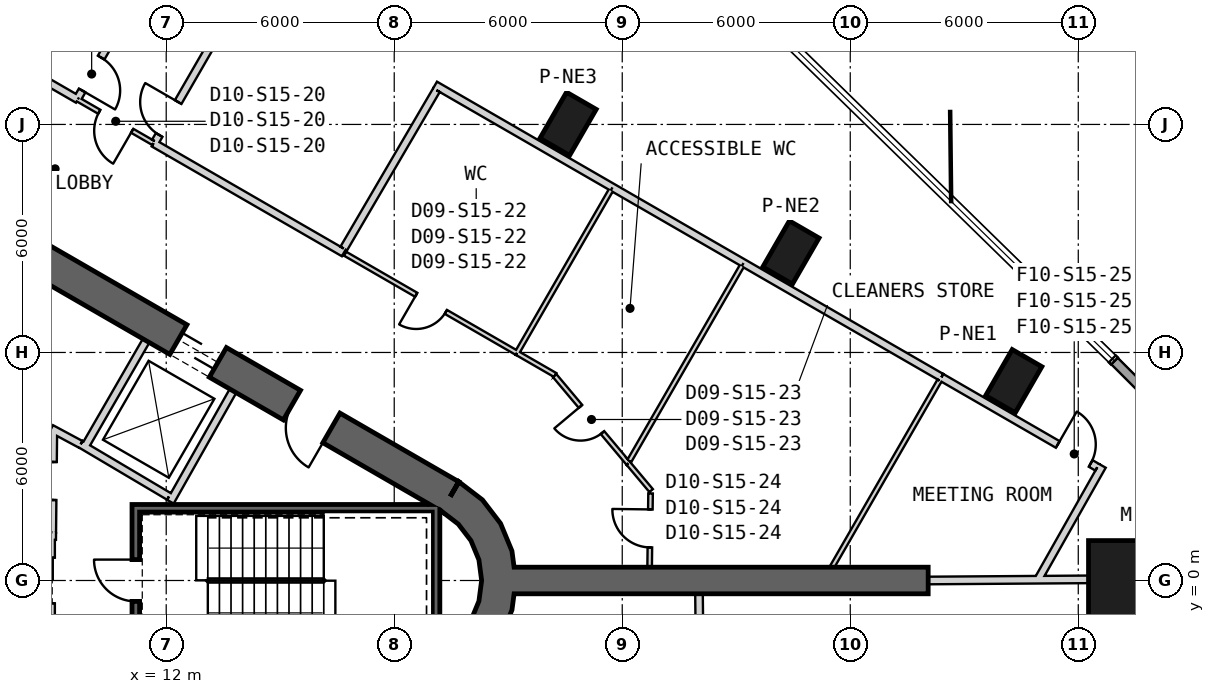
"""IFC4 building model, lengths in metres.
Left out: names, types, materials, properties, quantities, classifications, styles, units other than length and angle.
Written with IfcOpenShell. Run it as: python <this file> out.ifc"""

import sys

from ifc_helpers import new_model, si_unit, direction, frame, frame_2d, origin, origin_2d, place, context, subcontext, project, spatial, polyline, rectangle, outline, extrude, element, fill, save


model = new_model("IFC4")
c1 = context("Model", 3, precision=1e-05, world=origin(), true_north=direction((0.0, 1.0)))
c2 = subcontext(c1, "Body", "Model", "MODEL_VIEW")
j1 = project(units=[si_unit("LENGTHUNIT", "METRE"), si_unit("PLANEANGLEUNIT", "RADIAN")], contexts=[c1])
p1 = place(None, origin())
s1 = spatial("IfcSite", under=j1, at=p1, CompositionType="ELEMENT")
p2 = place(p1, origin())
s2 = spatial("IfcBuilding", under=s1, at=p2, CompositionType="ELEMENT")
p3 = place(p2, frame((0.0, 0.0, 241.2)))
s3 = spatial("IfcBuildingStorey", under=s2, at=p3, CompositionType="ELEMENT", Elevation=241.2)
p4 = place(p3, frame((37.57, 0.0, 0.0), z_axis=(0.0, 0.0, 1.0), x_axis=(1.0, 0.0, 0.0)))
e1 = element("IfcColumn", 1, at=p4, inside=s3, PredefinedType="COLUMN", context=c2, shape_type="SweptSolid", body=[
    extrude(rectangle(XDim=2.6, YDim=2.1, at=origin_2d()), origin(), (0.0, 0.0, 1.0), 4.0),
])
for number, where, z_axis, x_axis in (
    (2, (34.302, 5.245, 0.0), (0.0, 0.0, 1.0), (0.5, 0.866, 0.0)),
    (3, (28.438, 8.631, 0.0), (0.0, 0.0, 1.0), (0.5, 0.866, 0.0)),
    (4, (22.574, 12.016, 0.0), (0.0, 0.0, 1.0), (0.5, 0.866, 0.0)),
):
    element("IfcColumn", number, at=place(p3, frame(where, z_axis=z_axis, x_axis=x_axis)), inside=s3, PredefinedType="COLUMN", context=c2, shape_type="SweptSolid", body=[
        extrude(rectangle(XDim=1.4, YDim=0.9, at=origin_2d()), origin(), (0.0, 0.0, 1.0), 4.0),
    ])
p5 = place(p3, frame((19.475, 2.208, 0.0), z_axis=(0.0, 0.0, 1.0), x_axis=(-0.866028369851, 0.499994862586, 0.0)))
e5 = element("IfcWall", 5, at=p5, inside=s3, PredefinedType="SHEAR", context=c2, shape_type="SweptSolid", body=[
    extrude(rectangle(XDim=31.523, YDim=0.9, at=frame_2d((15.762, 0.0))), origin(), (0.0, 0.0, 1.0), 4.0),
])
p6 = place(p5, frame((7.062, 0.0, 0.0)))
e6 = element("IfcOpeningElement", 6, at=p6, cuts=e5, PredefinedType="OPENING", context=c2, shape_type="SweptSolid", body=[
    extrude(rectangle(XDim=1.2, YDim=2.4, at=frame_2d((0.6, 1.2))), frame((0.0, 0.46, 0.0), z_axis=(0.0, -1.0, 0.0), x_axis=(1.0, 0.0, 0.0)), (0.0, 0.0, 1.0), 0.92),
])
p7 = place(p5, frame((3.612, 0.0, 0.0)))
e7 = element("IfcOpeningElement", 7, at=p7, cuts=e5, PredefinedType="OPENING", context=c2, shape_type="SweptSolid", body=[
    extrude(rectangle(XDim=1.2, YDim=2.4, at=frame_2d((0.6, 1.2))), frame((0.0, 0.46, 0.0), z_axis=(0.0, -1.0, 0.0), x_axis=(1.0, 0.0, 0.0)), (0.0, 0.0, 1.0), 0.92),
])
p8 = place(p5, frame((26.712, 0.0, 0.0)))
e8 = element("IfcOpeningElement", 8, at=p8, cuts=e5, PredefinedType="OPENING", context=c2, shape_type="SweptSolid", body=[
    extrude(rectangle(XDim=1.2, YDim=2.4, at=frame_2d((0.6, 1.2))), frame((0.0, 0.46, 0.0), z_axis=(0.0, -1.0, 0.0), x_axis=(1.0, 0.0, 0.0)), (0.0, 0.0, 1.0), 0.92),
])
p9 = place(p3, origin())
e9 = element("IfcWall", 9, at=p9, inside=s3, PredefinedType="SHEAR", context=c2, shape_type="SweptSolid", body=[
    extrude(outline(polyline([(19.7, -2.598), (20.321, -2.121), (20.798, -1.5), (21.098, -0.777), (21.2, 0.0), (21.098, 0.777), (20.798, 1.5), (20.321, 2.121), (19.7, 2.598), (19.25, 1.819), (19.685, 1.485), (20.019, 1.05), (20.229, 0.543), (20.3, 0.0), (20.229, -0.543), (20.019, -1.05), (19.685, -1.485), (19.25, -1.819), (19.7, -2.598)])), origin(), (0.0, 0.0, 1.0), 4.0),
])
p10 = place(p3, frame((21.15, 0.0, 0.0), z_axis=(0.0, 0.0, 1.0), x_axis=(1.0, 0.0, 0.0)))
e10 = element("IfcWall", 10, at=p10, inside=s3, PredefinedType="SHEAR", context=c2, shape_type="SweptSolid", body=[
    extrude(rectangle(XDim=10.9, YDim=0.7, at=frame_2d((5.45, 0.0))), origin(), (0.0, 0.0, 1.0), 4.0),
])
p11 = place(p3, frame((39.406, 3.321, 0.0), z_axis=(0.0, 0.0, 1.0), x_axis=(-0.707106781187, 0.707106781187, 0.0)))
e11 = element("IfcWall", 11, at=p11, inside=s3, PredefinedType="SOLIDWALL", context=c2, shape_type="SweptSolid", body=[
    extrude(rectangle(XDim=3.47, YDim=0.24, at=frame_2d((1.735, 0.0))), origin(), (0.0, 0.0, 1.0), 3.7),
])
p12 = place(p3, frame((9.847, 3.495, 0.0), z_axis=(0.0, 0.0, 1.0), x_axis=(0.499984717929, 0.866034226713, 0.0)))
e12 = element("IfcWall", 12, at=p12, inside=s3, PredefinedType="PLUMBINGWALL", context=c2, shape_type="SweptSolid", body=[
    extrude(rectangle(XDim=3.25, YDim=0.2, at=frame_2d((1.625, 0.0))), origin(), (0.0, 0.0, 1.0), 3.7),
])
p13 = place(p3, frame((12.11, 2.073, 0.0), z_axis=(0.0, 0.0, 1.0), x_axis=(0.49196600604, 0.870614408852, 0.0)))
e13 = element("IfcWall", 13, at=p13, inside=s3, PredefinedType="PLUMBINGWALL", context=c2, shape_type="SweptSolid", body=[
    extrude(rectangle(XDim=3.35, YDim=0.2, at=frame_2d((1.675, 0.0))), origin(), (0.0, 0.0, 1.0), 3.7),
])
p14 = place(p3, frame((12.073, 2.211, 0.0), z_axis=(0.0, 0.0, 1.0), x_axis=(-0.860414880418, 0.509594185166, 0.0)))
e14 = element("IfcWall", 14, at=p14, inside=s3, PredefinedType="PLUMBINGWALL", context=c2, shape_type="SweptSolid", body=[
    extrude(rectangle(XDim=2.7, YDim=0.2, at=frame_2d((1.35, 0.0))), origin(), (0.0, 0.0, 1.0), 3.7),
])
p15 = place(p3, frame((19.2, 1.9, -0.3), z_axis=(0.0, 0.0, 1.0), x_axis=(-1.0, 0.0, 0.0)))
e15 = element("IfcWall", 15, at=p15, inside=s3, PredefinedType="SHEAR", context=c2, shape_type="SweptSolid", body=[
    extrude(rectangle(XDim=8.1, YDim=0.2, at=frame_2d((4.05, 0.0))), origin(), (0.0, 0.0, 1.0), 4.0),
])
p16 = place(p3, frame((19.1, -2.0, -0.3), z_axis=(0.0, 0.0, 1.0), x_axis=(0.0, 1.0, 0.0)))
e16 = element("IfcWall", 16, at=p16, inside=s3, PredefinedType="SHEAR", context=c2, shape_type="SweptSolid", body=[
    extrude(rectangle(XDim=3.8, YDim=0.2, at=frame_2d((1.9, 0.0))), origin(), (0.0, 0.0, 1.0), 4.0),
])
p17 = place(p3, frame((11.2, -1.8, -0.3), z_axis=(0.0, 0.0, 1.0), x_axis=(0.0, 1.0, 0.0)))
e17 = element("IfcWall", 17, at=p17, inside=s3, PredefinedType="SHEAR", context=c2, shape_type="SweptSolid", body=[
    extrude(rectangle(XDim=3.6, YDim=0.2, at=frame_2d((1.8, 0.0))), origin(), (0.0, 0.0, 1.0), 4.0),
])
p18 = place(p17, frame((1.25, 0.0, 0.3)))
e18 = element("IfcOpeningElement", 18, at=p18, cuts=e17, PredefinedType="OPENING", context=c2, shape_type="SweptSolid", body=[
    extrude(rectangle(XDim=1.1, YDim=2.1, at=frame_2d((0.55, 1.05))), frame((0.0, 0.11, 0.0), z_axis=(0.0, -1.0, 0.0), x_axis=(1.0, 0.0, 0.0)), (0.0, 0.0, 1.0), 0.22),
])
p19 = place(p3, frame((8.97, 1.2, 0.0), z_axis=(0.0, 0.0, 1.0), x_axis=(0.0, -1.0, 0.0)))
e19 = element("IfcWall", 19, at=p19, inside=s3, PredefinedType="PLUMBINGWALL", context=c2, shape_type="SweptSolid", body=[
    extrude(rectangle(XDim=2.4, YDim=0.2, at=frame_2d((1.2, 0.0))), origin(), (0.0, 0.0, 1.0), 3.7),
])
p20 = place(p19, frame((0.6, 0.0, 0.0)))
e20 = element("IfcOpeningElement", 20, at=p20, cuts=e19, PredefinedType="OPENING", context=c2, shape_type="SweptSolid", body=[
    extrude(rectangle(XDim=1.2, YDim=2.4, at=frame_2d((0.6, 1.2))), frame((0.0, 0.11, 0.0), z_axis=(0.0, -1.0, 0.0), x_axis=(1.0, 0.0, 0.0)), (0.0, 0.0, 1.0), 0.22),
])
p21 = place(p3, frame((9.1, 1.169, 0.0), z_axis=(0.0, 0.0, 1.0), x_axis=(-0.99994990606, 0.010009264196, 0.0)))
e21 = element("IfcWall", 21, at=p21, inside=s3, PredefinedType="PLUMBINGWALL", context=c2, shape_type="SweptSolid", body=[
    extrude(rectangle(XDim=3.0, YDim=0.2, at=frame_2d((1.5, 0.0))), origin(), (0.0, 0.0, 1.0), 3.7),
])
p22 = place(p3, frame((8.974, 3.999, 0.0), z_axis=(0.0, 0.0, 1.0), x_axis=(0.880917147855, -0.473270513147, 0.0)))
e22 = element("IfcWall", 22, at=p22, inside=s3, PredefinedType="PARTITIONING", context=c2, shape_type="SweptSolid", body=[
    extrude(rectangle(XDim=0.878, YDim=0.2, at=frame_2d((0.439, 0.0))), origin(), (0.0, 0.0, 1.0), 3.7),
])
p23 = place(p3, frame((9.001, 1.27, 0.0), z_axis=(0.0, 0.0, 1.0), x_axis=(0.010723968736, 0.999942496594, 0.0)))
e23 = element("IfcWall", 23, at=p23, inside=s3, PredefinedType="PARTITIONING", context=c2, shape_type="SweptSolid", body=[
    extrude(rectangle(XDim=2.709, YDim=0.2, at=frame_2d((1.354, 0.0))), origin(), (0.0, 0.0, 1.0), 3.7),
])
p24 = place(p23, frame((0.848, 0.0, 0.0)))
e24 = element("IfcOpeningElement", 24, at=p24, cuts=e23, PredefinedType="OPENING", context=c2, shape_type="SweptSolid", body=[
    extrude(rectangle(XDim=1.0, YDim=2.1, at=frame_2d((0.5, 1.05))), frame((0.0, 0.11, 0.0), z_axis=(0.0, -1.0, 0.0), x_axis=(1.0, 0.0, 0.0)), (0.0, 0.0, 1.0), 0.22),
])
p25 = place(p3, frame((22.236, 5.406, 0.0), z_axis=(0.0, 0.0, 1.0), x_axis=(-0.866024722723, 0.500001179632, 0.0)))
e25 = element("IfcWall", 25, at=p25, inside=s3, PredefinedType="PARTITIONING", context=c2, shape_type="SweptSolid", body=[
    extrude(rectangle(XDim=1.163, YDim=0.12, at=frame_2d((0.581, 0.0))), origin(), (0.0, 0.0, 1.0), 3.7),
])
p26 = place(p3, frame((21.229, 5.988, 0.0), z_axis=(0.0, 0.0, 1.0), x_axis=(-0.866024383922, 0.50000176645, 0.0)))
e26 = element("IfcWall", 26, at=p26, inside=s3, PredefinedType="PARTITIONING", context=c2, shape_type="SweptSolid", body=[
    extrude(rectangle(XDim=5.221, YDim=0.12, at=frame_2d((2.61, 0.0))), origin(), (0.0, 0.0, 1.0), 2.98),
])
p27 = place(p26, frame((2.16, 0.0, 0.0)))
e27 = element("IfcOpeningElement", 27, at=p27, cuts=e26, PredefinedType="OPENING", context=c2, shape_type="SweptSolid", body=[
    extrude(rectangle(XDim=0.9, YDim=2.1, at=frame_2d((0.45, 1.05))), frame((0.0, 0.07, 0.0), z_axis=(0.0, -1.0, 0.0), x_axis=(1.0, 0.0, 0.0)), (0.0, 0.0, 1.0), 0.14),
])
p28 = place(p3, frame((11.667, 11.508, 0.0), z_axis=(0.0, 0.0, 1.0), x_axis=(-0.866053019151, 0.499952165731, 0.0)))
e28 = element("IfcWall", 28, at=p28, inside=s3, PredefinedType="PARTITIONING", context=c2, shape_type="SweptSolid", body=[
    extrude(rectangle(XDim=2.3, YDim=0.12, at=frame_2d((1.15, 0.0))), origin(), (0.0, 0.0, 1.0), 3.7),
])
p29 = place(p28, frame((0.65, 0.0, 0.0)))
e29 = element("IfcOpeningElement", 29, at=p29, cuts=e28, PredefinedType="OPENING", context=c2, shape_type="SweptSolid", body=[
    extrude(rectangle(XDim=1.0, YDim=2.1, at=frame_2d((0.5, 1.05))), frame((0.0, 0.07, 0.0), z_axis=(0.0, -1.0, 0.0), x_axis=(1.0, 0.0, 0.0)), (0.0, 0.0, 1.0), 0.14),
])
p30 = place(p3, frame((16.673, 8.618, 0.0), z_axis=(0.0, 0.0, 1.0), x_axis=(-0.866014659605, 0.500018609004, 0.0)))
e30 = element("IfcWall", 30, at=p30, inside=s3, PredefinedType="PARTITIONING", context=c2, shape_type="SweptSolid", body=[
    extrude(rectangle(XDim=5.78, YDim=0.2, at=frame_2d((2.89, 0.0))), origin(), (0.0, 0.0, 1.0), 2.98),
])
p31 = place(p3, frame((9.675, 12.658, 0.0), z_axis=(0.0, 0.0, 1.0), x_axis=(-0.866025327327, 0.500000132428, 0.0)))
e31 = element("IfcWall", 31, at=p31, inside=s3, PredefinedType="PARTITIONING", context=c2, shape_type="SweptSolid", body=[
    extrude(rectangle(XDim=18.443, YDim=0.2, at=frame_2d((9.222, 0.0))), origin(), (0.0, 0.0, 1.0), 2.98),
])
p32 = place(p31, frame((15.138, 0.0, 0.0)))
e32 = element("IfcOpeningElement", 32, at=p32, cuts=e31, PredefinedType="OPENING", context=c2, shape_type="SweptSolid", body=[
    extrude(rectangle(XDim=1.0, YDim=2.1, at=frame_2d((0.5, 1.05))), frame((0.0, 0.11, 0.0), z_axis=(0.0, -1.0, 0.0), x_axis=(1.0, 0.0, 0.0)), (0.0, 0.0, 1.0), 0.22),
])
p33 = place(p3, frame((24.76, 2.365, 0.0), z_axis=(0.0, 0.0, 1.0), x_axis=(-0.642800124371, 0.766033941878, 0.0)))
e33 = element("IfcWall", 33, at=p33, inside=s3, PredefinedType="PARTITIONING", context=c2, shape_type="SweptSolid", body=[
    extrude(rectangle(XDim=0.935, YDim=0.12, at=frame_2d((0.468, 0.0))), origin(), (0.0, 0.0, 1.0), 3.7),
])
p34 = place(p3, frame((24.159, 3.082, 0.0), z_axis=(0.0, 0.0, 1.0), x_axis=(-0.642770249036, 0.766059010099, 0.0)))
e34 = element("IfcWall", 34, at=p34, inside=s3, PredefinedType="PARTITIONING", context=c2, shape_type="SweptSolid", body=[
    extrude(rectangle(XDim=3.014, YDim=0.12, at=frame_2d((1.507, 0.0))), origin(), (0.0, 0.0, 1.0), 2.88),
])
p35 = place(p34, frame((1.057, 0.0, 0.0)))
e35 = element("IfcOpeningElement", 35, at=p35, cuts=e34, PredefinedType="OPENING", context=c2, shape_type="SweptSolid", body=[
    extrude(rectangle(XDim=0.9, YDim=2.1, at=frame_2d((0.45, 1.05))), frame((0.0, 0.07, 0.0), z_axis=(0.0, -1.0, 0.0), x_axis=(1.0, 0.0, 0.0)), (0.0, 0.0, 1.0), 0.14),
])
p36 = place(p3, frame((24.721, 0.35, 0.0), z_axis=(0.0, 0.0, 1.0), x_axis=(0.012579203405, 0.999920878691, 0.0)))
e36 = element("IfcWall", 36, at=p36, inside=s3, PredefinedType="PARTITIONING", context=c2, shape_type="SweptSolid", body=[
    extrude(rectangle(XDim=1.941, YDim=0.12, at=frame_2d((0.97, 0.0))), origin(), (0.0, 0.0, 1.0), 3.7),
])
p37 = place(p36, frame((0.521, 0.0, 0.0)))
e37 = element("IfcOpeningElement", 37, at=p37, cuts=e36, PredefinedType="OPENING", context=c2, shape_type="SweptSolid", body=[
    extrude(rectangle(XDim=1.0, YDim=2.1, at=frame_2d((0.5, 1.05))), frame((0.0, 0.07, 0.0), z_axis=(0.0, -1.0, 0.0), x_axis=(1.0, 0.0, 0.0)), (0.0, 0.0, 1.0), 0.14),
])
p38 = place(p3, frame((26.047, -2.972, 0.0), z_axis=(0.0, 0.0, 1.0), x_axis=(-0.010519853563, 0.99994466481, 0.0)))
e38 = element("IfcWall", 38, at=p38, inside=s3, PredefinedType="PARTITIONING", context=c2, shape_type="SweptSolid", body=[
    extrude(rectangle(XDim=2.623, YDim=0.2, at=frame_2d((1.311, 0.0))), origin(), (0.0, 0.0, 1.0), 3.7),
])
p39 = place(p3, frame((15.187, 22.245, 0.0), z_axis=(0.0, 0.0, 1.0), x_axis=(-0.49999723543, -0.866026999904, 0.0)))
e39 = element("IfcWall", 39, at=p39, inside=s3, PredefinedType="PARTITIONING", context=c2, shape_type="SweptSolid", body=[
    extrude(rectangle(XDim=10.998, YDim=0.2, at=frame_2d((5.499, 0.0))), origin(), (0.0, 0.0, 1.0), 3.7),
])
p40 = place(p39, frame((9.798, 0.0, 0.0)))
e40 = element("IfcOpeningElement", 40, at=p40, cuts=e39, PredefinedType="OPENING", context=c2, shape_type="SweptSolid", body=[
    extrude(rectangle(XDim=1.0, YDim=2.1, at=frame_2d((0.5, 1.05))), frame((0.0, 0.11, 0.0), z_axis=(0.0, -1.0, 0.0), x_axis=(1.0, 0.0, 0.0)), (0.0, 0.0, 1.0), 0.22),
])
p41 = place(p3, frame((11.715, 11.55, 0.0), z_axis=(0.0, 0.0, 1.0), x_axis=(0.499999401607, 0.866025749266, 0.0)))
e41 = element("IfcWall", 41, at=p41, inside=s3, PredefinedType="PARTITIONING", context=c2, shape_type="SweptSolid", body=[
    extrude(rectangle(XDim=10.938, YDim=0.2, at=frame_2d((5.469, 0.0))), origin(), (0.0, 0.0, 1.0), 3.7),
])
p42 = place(p41, frame((0.2, 0.0, 0.0)))
e42 = element("IfcOpeningElement", 42, at=p42, cuts=e41, PredefinedType="OPENING", context=c2, shape_type="SweptSolid", body=[
    extrude(rectangle(XDim=1.0, YDim=2.1, at=frame_2d((0.5, 1.05))), frame((0.0, 0.11, 0.0), z_axis=(0.0, -1.0, 0.0), x_axis=(1.0, 0.0, 0.0)), (0.0, 0.0, 1.0), 0.22),
])
p43 = place(p3, frame((36.27, 0.03, 0.0), z_axis=(0.0, 0.0, 1.0), x_axis=(-0.999974676399, -0.007116639773, 0.0)))
e43 = element("IfcWall", 43, at=p43, inside=s3, PredefinedType="PARTITIONING", context=c2, shape_type="SweptSolid", body=[
    extrude(rectangle(XDim=4.219, YDim=0.2, at=frame_2d((2.11, 0.0))), origin(), (0.0, 0.0, 1.0), 3.27),
])
p44 = place(p3, frame((19.075, 13.039, 0.0), z_axis=(0.0, 0.0, 1.0), x_axis=(0.866038526581, -0.499977269961, 0.0)))
e44 = element("IfcWall", 44, at=p44, inside=s3, PredefinedType="PARTITIONING", context=c2, shape_type="SweptSolid", body=[
    extrude(rectangle(XDim=5.391, YDim=0.2, at=frame_2d((2.695, 0.0))), origin(), (0.0, 0.0, 1.0), 2.98),
])
p45 = place(p3, frame((23.744, 10.344, 0.0), z_axis=(0.0, 0.0, 1.0), x_axis=(0.86599666964, -0.500049765695, 0.0)))
e45 = element("IfcWall", 45, at=p45, inside=s3, PredefinedType="PARTITIONING", context=c2, shape_type="SweptSolid", body=[
    extrude(rectangle(XDim=3.981, YDim=0.2, at=frame_2d((1.991, 0.0))), origin(), (0.0, 0.0, 1.0), 2.98),
])
p46 = place(p3, frame((27.192, 8.353, 0.0), z_axis=(0.0, 0.0, 1.0), x_axis=(0.866025306899, -0.50000016781, 0.0)))
e46 = element("IfcWall", 46, at=p46, inside=s3, PredefinedType="PARTITIONING", context=c2, shape_type="SweptSolid", body=[
    extrude(rectangle(XDim=6.012, YDim=0.2, at=frame_2d((3.006, 0.0))), origin(), (0.0, 0.0, 1.0), 2.98),
])
p47 = place(p3, frame((32.398, 5.347, 0.0), z_axis=(0.0, 0.0, 1.0), x_axis=(0.866036218949, -0.499981267118, 0.0)))
e47 = element("IfcWall", 47, at=p47, inside=s3, PredefinedType="PARTITIONING", context=c2, shape_type="SweptSolid", body=[
    extrude(rectangle(XDim=4.736, YDim=0.2, at=frame_2d((2.368, 0.0))), origin(), (0.0, 0.0, 1.0), 2.88),
])
p48 = place(p47, frame((3.536, 0.0, 0.0)))
e48 = element("IfcOpeningElement", 48, at=p48, cuts=e47, PredefinedType="OPENING", context=c2, shape_type="SweptSolid", body=[
    extrude(rectangle(XDim=1.0, YDim=2.1, at=frame_2d((0.5, 1.05))), frame((0.0, 0.11, 0.0), z_axis=(0.0, -1.0, 0.0), x_axis=(1.0, 0.0, 0.0)), (0.0, 0.0, 1.0), 0.22),
])
p49 = place(p3, frame((19.111, 12.903, 0.0), z_axis=(0.0, 0.0, 1.0), x_axis=(-0.505159000856, -0.863026293837, 0.0)))
e49 = element("IfcWall", 49, at=p49, inside=s3, PredefinedType="PARTITIONING", context=c2, shape_type="SweptSolid", body=[
    extrude(rectangle(XDim=4.83, YDim=0.2, at=frame_2d((2.415, 0.0))), origin(), (0.0, 0.0, 1.0), 2.98),
])
p50 = place(p3, frame((34.93, 0.0, 0.0), z_axis=(0.0, 0.0, 1.0), x_axis=(0.49225689493, 0.870449969495, 0.0)))
e50 = element("IfcWall", 50, at=p50, inside=s3, PredefinedType="PARTITIONING", context=c2, shape_type="SweptSolid", body=[
    extrude(rectangle(XDim=3.465, YDim=0.2, at=frame_2d((1.733, 0.0))), origin(), (0.0, 0.0, 1.0), 3.27),
])
p51 = place(p3, frame((21.259, 6.04, 0.0), z_axis=(0.0, 0.0, 1.0), x_axis=(0.500010305712, 0.866019453697, 0.0)))
e51 = element("IfcWall", 51, at=p51, inside=s3, PredefinedType="PARTITIONING", context=c2, shape_type="SweptSolid", body=[
    extrude(rectangle(XDim=4.87, YDim=0.12, at=frame_2d((2.435, 0.0))), origin(), (0.0, 0.0, 1.0), 2.98),
])
p52 = place(p3, frame((27.142, 8.267, 0.0), z_axis=(0.0, 0.0, 1.0), x_axis=(-0.499992838882, -0.866029538218, 0.0)))
e52 = element("IfcWall", 52, at=p52, inside=s3, PredefinedType="PARTITIONING", context=c2, shape_type="SweptSolid", body=[
    extrude(rectangle(XDim=5.914, YDim=0.12, at=frame_2d((2.957, 0.0))), origin(), (0.0, 0.0, 1.0), 2.88),
])
p53 = place(p3, frame((29.518, 0.35, 0.0), z_axis=(0.0, 0.0, 1.0), x_axis=(0.499424120211, 0.866357632939, 0.0)))
e53 = element("IfcWall", 53, at=p53, inside=s3, PredefinedType="PARTITIONING", context=c2, shape_type="SweptSolid", body=[
    extrude(rectangle(XDim=5.668, YDim=0.12, at=frame_2d((2.834, 0.0))), origin(), (0.0, 0.0, 1.0), 2.88),
])
p54 = place(p18, origin())
e54 = element("IfcDoor", 54, at=p54, inside=s3, OperationType="SINGLE_SWING_RIGHT", PredefinedType="USERDEFINED", context=c2, shape_type="SweptSolid", body=[
    extrude(rectangle(XDim=1.1, YDim=2.1, at=frame_2d((0.55, 1.05))), frame((0.0, 0.025, 0.0), z_axis=(0.0, -1.0, 0.0), x_axis=(1.0, 0.0, 0.0)), (0.0, 0.0, 1.0), 0.05),
])
fill(e18, e54)
p55 = place(p24, origin())
e55 = element("IfcDoor", 55, at=p55, inside=s3, OperationType="SINGLE_SWING_LEFT", PredefinedType="USERDEFINED", context=c2, shape_type="SweptSolid", body=[
    extrude(rectangle(XDim=1.0, YDim=2.1, at=frame_2d((0.5, 1.05))), frame((0.0, 0.025, 0.0), z_axis=(0.0, -1.0, 0.0), x_axis=(1.0, 0.0, 0.0)), (0.0, 0.0, 1.0), 0.05),
])
fill(e24, e55)
p56 = place(p29, origin())
e56 = element("IfcDoor", 56, at=p56, inside=s3, OperationType="SINGLE_SWING_LEFT", PredefinedType="NOTDEFINED", context=c2, shape_type="SweptSolid", body=[
    extrude(rectangle(XDim=1.0, YDim=2.1, at=frame_2d((0.5, 1.05))), frame((0.0, 0.025, 0.0), z_axis=(0.0, -1.0, 0.0), x_axis=(1.0, 0.0, 0.0)), (0.0, 0.0, 1.0), 0.05),
])
fill(e29, e56)
p57 = place(p27, origin())
e57 = element("IfcDoor", 57, at=p57, inside=s3, OperationType="SINGLE_SWING_RIGHT", PredefinedType="NOTDEFINED", context=c2, shape_type="SweptSolid", body=[
    extrude(rectangle(XDim=0.9, YDim=2.1, at=frame_2d((0.45, 1.05))), frame((0.0, 0.025, 0.0), z_axis=(0.0, -1.0, 0.0), x_axis=(1.0, 0.0, 0.0)), (0.0, 0.0, 1.0), 0.05),
])
fill(e27, e57)
p58 = place(p35, origin())
e58 = element("IfcDoor", 58, at=p58, inside=s3, OperationType="SINGLE_SWING_RIGHT", PredefinedType="NOTDEFINED", context=c2, shape_type="SweptSolid", body=[
    extrude(rectangle(XDim=0.9, YDim=2.1, at=frame_2d((0.45, 1.05))), frame((0.0, 0.025, 0.0), z_axis=(0.0, -1.0, 0.0), x_axis=(1.0, 0.0, 0.0)), (0.0, 0.0, 1.0), 0.05),
])
fill(e35, e58)
p59 = place(p37, origin())
e59 = element("IfcDoor", 59, at=p59, inside=s3, OperationType="SINGLE_SWING_RIGHT", PredefinedType="NOTDEFINED", context=c2, shape_type="SweptSolid", body=[
    extrude(rectangle(XDim=1.0, YDim=2.1, at=frame_2d((0.5, 1.05))), frame((0.0, 0.025, 0.0), z_axis=(0.0, -1.0, 0.0), x_axis=(1.0, 0.0, 0.0)), (0.0, 0.0, 1.0), 0.05),
])
fill(e37, e59)
p60 = place(p48, origin())
e60 = element("IfcDoor", 60, at=p60, inside=s3, OperationType="SINGLE_SWING_RIGHT", PredefinedType="USERDEFINED", context=c2, shape_type="SweptSolid", body=[
    extrude(rectangle(XDim=1.0, YDim=2.1, at=frame_2d((0.5, 1.05))), frame((0.0, 0.025, 0.0), z_axis=(0.0, -1.0, 0.0), x_axis=(1.0, 0.0, 0.0)), (0.0, 0.0, 1.0), 0.05),
])
fill(e48, e60)
p61 = place(p40, origin())
e61 = element("IfcDoor", 61, at=p61, inside=s3, OperationType="SINGLE_SWING_LEFT", PredefinedType="USERDEFINED", context=c2, shape_type="SweptSolid", body=[
    extrude(rectangle(XDim=1.0, YDim=2.1, at=frame_2d((0.5, 1.05))), frame((0.0, 0.025, 0.0), z_axis=(0.0, -1.0, 0.0), x_axis=(1.0, 0.0, 0.0)), (0.0, 0.0, 1.0), 0.05),
])
fill(e40, e61)
p62 = place(p42, origin())
e62 = element("IfcDoor", 62, at=p62, inside=s3, OperationType="SINGLE_SWING_RIGHT", PredefinedType="USERDEFINED", context=c2, shape_type="SweptSolid", body=[
    extrude(rectangle(XDim=1.0, YDim=2.1, at=frame_2d((0.5, 1.05))), frame((0.0, 0.025, 0.0), z_axis=(0.0, -1.0, 0.0), x_axis=(1.0, 0.0, 0.0)), (0.0, 0.0, 1.0), 0.05),
])
fill(e42, e62)
p63 = place(p6, origin())
e63 = element("IfcDoor", 63, at=p63, inside=s3, OperationType="SLIDING_TO_LEFT", PredefinedType="USERDEFINED", context=c2, shape_type="SweptSolid", body=[
    extrude(rectangle(XDim=1.2, YDim=2.4, at=frame_2d((0.6, 1.2))), frame((0.0, 0.025, 0.0), z_axis=(0.0, -1.0, 0.0), x_axis=(1.0, 0.0, 0.0)), (0.0, 0.0, 1.0), 0.05),
])
fill(e6, e63)
p64 = place(p7, origin())
e64 = element("IfcDoor", 64, at=p64, inside=s3, OperationType="SINGLE_SWING_RIGHT", PredefinedType="USERDEFINED", context=c2, shape_type="SweptSolid", body=[
    extrude(rectangle(XDim=1.2, YDim=2.4, at=frame_2d((0.6, 1.2))), frame((0.0, 0.025, 0.0), z_axis=(0.0, -1.0, 0.0), x_axis=(1.0, 0.0, 0.0)), (0.0, 0.0, 1.0), 0.05),
])
fill(e7, e64)
save(model, sys.argv[1])
